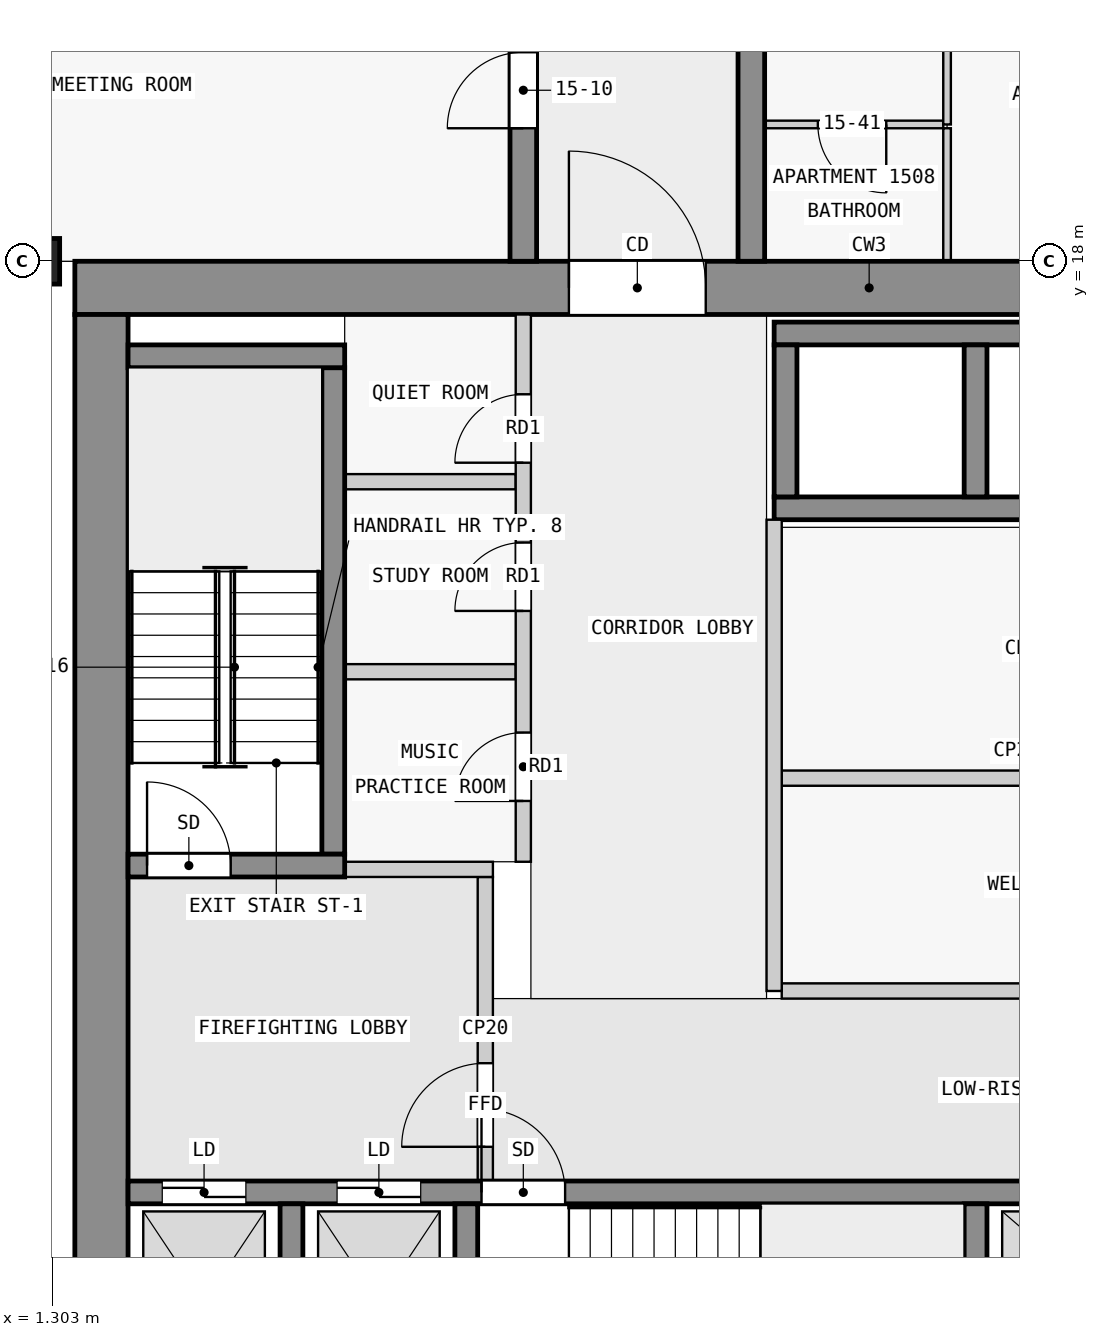
"""IFC4 building model, lengths in metres.
Left out: names, types, materials, properties, quantities, classifications, styles, units other than length and angle.
Written with IfcOpenShell. Run it as: python <this file> out.ifc"""

import sys

from ifc_helpers import new_model, si_unit, direction, frame, frame_2d, origin, origin_2d, place, context, subcontext, project, spatial, rectangle, extrude, element, fill, save


model = new_model("IFC4")
c1 = context("Model", 3, precision=1e-05, world=origin(), true_north=direction((0.0, 1.0)))
c2 = subcontext(c1, "Body", "Model", "MODEL_VIEW")
j1 = project(units=[si_unit("LENGTHUNIT", "METRE"), si_unit("PLANEANGLEUNIT", "RADIAN")], contexts=[c1])
p1 = place(None, origin())
s1 = spatial("IfcSite", under=j1, at=p1, CompositionType="ELEMENT")
p2 = place(p1, origin())
s2 = spatial("IfcBuilding", under=s1, at=p2, CompositionType="ELEMENT")
p3 = place(p2, frame((0.0, 0.0, 61.8)))
s3 = spatial("IfcBuildingStorey", under=s2, at=p3, CompositionType="ELEMENT", Elevation=61.8)
p4 = place(p3, frame((0.7, 18.0, 0.0), z_axis=(0.0, 0.0, 1.0), x_axis=(0.0, 1.0, 0.0)))
e1 = element("IfcColumn", 1, at=p4, inside=s3, PredefinedType="COLUMN", context=c2, shape_type="SweptSolid", body=[
    extrude(rectangle(XDim=0.6, YDim=1.4, at=origin_2d()), origin(), (0.0, 0.0, 1.0), 3.5),
])
p5 = place(p3, frame((1.6, 17.65, 0.0), z_axis=(0.0, 0.0, 1.0), x_axis=(1.0, 0.0, 0.0)))
e2 = element("IfcWall", 2, at=p5, inside=s3, PredefinedType="SHEAR", context=c2, shape_type="SweptSolid", body=[
    extrude(rectangle(XDim=20.9, YDim=0.7, at=frame_2d((10.45, 0.0))), origin(), (0.0, 0.0, 1.0), 3.25),
])
p6 = place(p5, frame((6.5, 0.0, 0.0)))
e3 = element("IfcOpeningElement", 3, at=p6, cuts=e2, PredefinedType="OPENING", context=c2, shape_type="SweptSolid", body=[
    extrude(rectangle(XDim=1.8, YDim=2.1, at=frame_2d((0.9, 1.05))), frame((0.0, 0.36, 0.0), z_axis=(0.0, -1.0, 0.0), x_axis=(1.0, 0.0, 0.0)), (0.0, 0.0, 1.0), 0.72),
])
p7 = place(p3, frame((1.95, 2.5, 0.0), z_axis=(0.0, 0.0, 1.0), x_axis=(0.0, 1.0, 0.0)))
e4 = element("IfcWall", 4, at=p7, inside=s3, PredefinedType="SHEAR", context=c2, shape_type="SweptSolid", body=[
    extrude(rectangle(XDim=14.8, YDim=0.7, at=frame_2d((7.4, 0.0))), origin(), (0.0, 0.0, 1.0), 3.25),
])
for number, where, z_axis, x_axis in (
    (5, (4.45, 2.8, 0.0), (0.0, 0.0, 1.0), (0.0, 1.0, 0.0)),
    (6, (6.75, 2.8, 0.0), (0.0, 0.0, 1.0), (0.0, 1.0, 0.0)),
    (7, (13.45, 2.8, 0.0), (0.0, 0.0, 1.0), (0.0, 1.0, 0.0)),
):
    element("IfcWall", number, at=place(p3, frame(where, z_axis=z_axis, x_axis=x_axis)), inside=s3, PredefinedType="SHEAR", context=c2, shape_type="SweptSolid", body=[
        extrude(rectangle(XDim=2.8, YDim=0.3, at=frame_2d((1.4, 0.0))), origin(), (0.0, 0.0, 1.0), 3.25),
    ])
p8 = place(p3, frame((2.3, 5.75, 0.0), z_axis=(0.0, 0.0, 1.0), x_axis=(1.0, 0.0, 0.0)))
e8 = element("IfcWall", 8, at=p8, inside=s3, PredefinedType="SHEAR", context=c2, shape_type="SweptSolid", body=[
    extrude(rectangle(XDim=18.8, YDim=0.3, at=frame_2d((9.4, 0.0))), origin(), (0.0, 0.0, 1.0), 3.25),
])
p9 = place(p8, frame((4.65, 0.0, 0.0)))
e9 = element("IfcOpeningElement", 9, at=p9, cuts=e8, PredefinedType="OPENING", context=c2, shape_type="SweptSolid", body=[
    extrude(rectangle(XDim=1.1, YDim=2.1, at=frame_2d((0.55, 1.05))), frame((0.0, 0.16, 0.0), z_axis=(0.0, -1.0, 0.0), x_axis=(1.0, 0.0, 0.0)), (0.0, 0.0, 1.0), 0.32),
])
p10 = place(p8, frame((0.45, 0.0, 0.0)))
e10 = element("IfcOpeningElement", 10, at=p10, cuts=e8, PredefinedType="OPENING", context=c2, shape_type="SweptSolid", body=[
    extrude(rectangle(XDim=1.1, YDim=2.1, at=frame_2d((0.55, 1.05))), frame((0.0, 0.16, 0.0), z_axis=(0.0, -1.0, 0.0), x_axis=(1.0, 0.0, 0.0)), (0.0, 0.0, 1.0), 0.32),
])
p11 = place(p8, frame((2.75, 0.0, 0.0)))
e11 = element("IfcOpeningElement", 11, at=p11, cuts=e8, PredefinedType="OPENING", context=c2, shape_type="SweptSolid", body=[
    extrude(rectangle(XDim=1.1, YDim=2.1, at=frame_2d((0.55, 1.05))), frame((0.0, 0.16, 0.0), z_axis=(0.0, -1.0, 0.0), x_axis=(1.0, 0.0, 0.0)), (0.0, 0.0, 1.0), 0.32),
])
p12 = place(p8, frame((11.85, 0.0, 0.0)))
e12 = element("IfcOpeningElement", 12, at=p12, cuts=e8, PredefinedType="OPENING", context=c2, shape_type="SweptSolid", body=[
    extrude(rectangle(XDim=1.1, YDim=2.1, at=frame_2d((0.55, 1.05))), frame((0.0, 0.16, 0.0), z_axis=(0.0, -1.0, 0.0), x_axis=(1.0, 0.0, 0.0)), (0.0, 0.0, 1.0), 0.32),
])
p13 = place(p8, frame((14.35, 0.0, 0.0)))
e13 = element("IfcOpeningElement", 13, at=p13, cuts=e8, PredefinedType="OPENING", context=c2, shape_type="SweptSolid", body=[
    extrude(rectangle(XDim=1.1, YDim=2.1, at=frame_2d((0.55, 1.05))), frame((0.0, 0.16, 0.0), z_axis=(0.0, -1.0, 0.0), x_axis=(1.0, 0.0, 0.0)), (0.0, 0.0, 1.0), 0.32),
])
p14 = place(p8, frame((16.85, 0.0, 0.0)))
e14 = element("IfcOpeningElement", 14, at=p14, cuts=e8, PredefinedType="OPENING", context=c2, shape_type="SweptSolid", body=[
    extrude(rectangle(XDim=1.1, YDim=2.1, at=frame_2d((0.55, 1.05))), frame((0.0, 0.16, 0.0), z_axis=(0.0, -1.0, 0.0), x_axis=(1.0, 0.0, 0.0)), (0.0, 0.0, 1.0), 0.32),
])
p15 = place(p3, frame((2.3, 10.05, 0.0), z_axis=(0.0, 0.0, 1.0), x_axis=(1.0, 0.0, 0.0)))
e15 = element("IfcWall", 15, at=p15, inside=s3, PredefinedType="SHEAR", context=c2, shape_type="SweptSolid", body=[
    extrude(rectangle(XDim=2.85, YDim=0.3, at=frame_2d((1.425, 0.0))), origin(), (0.0, 0.0, 1.0), 3.25),
])
p16 = place(p15, frame((0.25, 0.0, 0.0)))
e16 = element("IfcOpeningElement", 16, at=p16, cuts=e15, PredefinedType="OPENING", context=c2, shape_type="SweptSolid", body=[
    extrude(rectangle(XDim=1.1, YDim=2.1, at=frame_2d((0.55, 1.05))), frame((0.0, 0.16, 0.0), z_axis=(0.0, -1.0, 0.0), x_axis=(1.0, 0.0, 0.0)), (0.0, 0.0, 1.0), 0.32),
])
p17 = place(p3, frame((5.0, 10.2, 0.0), z_axis=(0.0, 0.0, 1.0), x_axis=(0.0, 1.0, 0.0)))
e17 = element("IfcWall", 17, at=p17, inside=s3, PredefinedType="SHEAR", context=c2, shape_type="SweptSolid", body=[
    extrude(rectangle(XDim=6.4, YDim=0.3, at=frame_2d((3.2, 0.0))), origin(), (0.0, 0.0, 1.0), 3.25),
])
p18 = place(p3, frame((2.3, 16.75, 0.0), z_axis=(0.0, 0.0, 1.0), x_axis=(1.0, 0.0, 0.0)))
e18 = element("IfcWall", 18, at=p18, inside=s3, PredefinedType="SHEAR", context=c2, shape_type="SweptSolid", body=[
    extrude(rectangle(XDim=2.85, YDim=0.3, at=frame_2d((1.425, 0.0))), origin(), (0.0, 0.0, 1.0), 3.25),
])
for number, where, z_axis, x_axis in (
    (19, (10.8, 17.05, 0.0), (0.0, 0.0, 1.0), (1.0, 0.0, 0.0)),
    (20, (10.8, 14.75, 0.0), (0.0, 0.0, 1.0), (1.0, 0.0, 0.0)),
):
    element("IfcWall", number, at=place(p3, frame(where, z_axis=z_axis, x_axis=x_axis)), inside=s3, PredefinedType="SHEAR", context=c2, shape_type="SweptSolid", body=[
        extrude(rectangle(XDim=7.8, YDim=0.3, at=frame_2d((3.9, 0.0))), origin(), (0.0, 0.0, 1.0), 3.25),
    ])
for number, where, z_axis, x_axis in (
    (21, (10.95, 14.9, 0.0), (0.0, 0.0, 1.0), (0.0, 1.0, 0.0)),
    (22, (13.45, 14.9, 0.0), (0.0, 0.0, 1.0), (0.0, 1.0, 0.0)),
):
    element("IfcWall", number, at=place(p3, frame(where, z_axis=z_axis, x_axis=x_axis)), inside=s3, PredefinedType="SHEAR", context=c2, shape_type="SweptSolid", body=[
        extrude(rectangle(XDim=2.0, YDim=0.3, at=frame_2d((1.0, 0.0))), origin(), (0.0, 0.0, 1.0), 3.25),
    ])
p19 = place(p3, frame((7.5, 18.0, 0.0), z_axis=(0.0, 0.0, 1.0), x_axis=(0.0, 1.0, 0.0)))
e23 = element("IfcWall", 23, at=p19, inside=s3, PredefinedType="SHEAR", context=c2, shape_type="SweptSolid", body=[
    extrude(rectangle(XDim=27.0, YDim=0.35, at=frame_2d((13.5, 0.0))), origin(), (0.0, 0.0, 1.0), 3.25),
])
p20 = place(p19, frame((1.75, 0.0, 0.0)))
e24 = element("IfcOpeningElement", 24, at=p20, cuts=e23, PredefinedType="OPENING", context=c2, shape_type="SweptSolid", body=[
    extrude(rectangle(XDim=1.0, YDim=2.1, at=frame_2d((0.5, 1.05))), frame((0.0, 0.185, 0.0), z_axis=(0.0, -1.0, 0.0), x_axis=(1.0, 0.0, 0.0)), (0.0, 0.0, 1.0), 0.37),
])
p21 = place(p19, frame((8.55, 0.0, 0.0)))
e25 = element("IfcOpeningElement", 25, at=p21, cuts=e23, PredefinedType="OPENING", context=c2, shape_type="SweptSolid", body=[
    extrude(rectangle(XDim=1.0, YDim=2.1, at=frame_2d((0.5, 1.05))), frame((0.0, 0.185, 0.0), z_axis=(0.0, -1.0, 0.0), x_axis=(1.0, 0.0, 0.0)), (0.0, 0.0, 1.0), 0.37),
])
p22 = place(p19, frame((15.25, 0.0, 0.0)))
e26 = element("IfcOpeningElement", 26, at=p22, cuts=e23, PredefinedType="OPENING", context=c2, shape_type="SweptSolid", body=[
    extrude(rectangle(XDim=1.0, YDim=2.1, at=frame_2d((0.5, 1.05))), frame((0.0, 0.185, 0.0), z_axis=(0.0, -1.0, 0.0), x_axis=(1.0, 0.0, 0.0)), (0.0, 0.0, 1.0), 0.37),
])
p23 = place(p19, frame((21.35, 0.0, 0.0)))
e27 = element("IfcOpeningElement", 27, at=p23, cuts=e23, PredefinedType="OPENING", context=c2, shape_type="SweptSolid", body=[
    extrude(rectangle(XDim=1.0, YDim=2.1, at=frame_2d((0.5, 1.05))), frame((0.0, 0.185, 0.0), z_axis=(0.0, -1.0, 0.0), x_axis=(1.0, 0.0, 0.0)), (0.0, 0.0, 1.0), 0.37),
])
p24 = place(p3, frame((10.5, 18.0, 0.0), z_axis=(0.0, 0.0, 1.0), x_axis=(0.0, 1.0, 0.0)))
e28 = element("IfcWall", 28, at=p24, inside=s3, PredefinedType="SHEAR", context=c2, shape_type="SweptSolid", body=[
    extrude(rectangle(XDim=27.0, YDim=0.35, at=frame_2d((13.5, 0.0))), origin(), (0.0, 0.0, 1.0), 3.25),
])
p25 = place(p24, frame((4.05, 0.0, 0.0)))
e29 = element("IfcOpeningElement", 29, at=p25, cuts=e28, PredefinedType="OPENING", context=c2, shape_type="SweptSolid", body=[
    extrude(rectangle(XDim=1.0, YDim=2.1, at=frame_2d((0.5, 1.05))), frame((0.0, 0.185, 0.0), z_axis=(0.0, -1.0, 0.0), x_axis=(1.0, 0.0, 0.0)), (0.0, 0.0, 1.0), 0.37),
])
p26 = place(p24, frame((10.75, 0.0, 0.0)))
e30 = element("IfcOpeningElement", 30, at=p26, cuts=e28, PredefinedType="OPENING", context=c2, shape_type="SweptSolid", body=[
    extrude(rectangle(XDim=1.0, YDim=2.1, at=frame_2d((0.5, 1.05))), frame((0.0, 0.185, 0.0), z_axis=(0.0, -1.0, 0.0), x_axis=(1.0, 0.0, 0.0)), (0.0, 0.0, 1.0), 0.37),
])
p27 = place(p24, frame((15.25, 0.0, 0.0)))
e31 = element("IfcOpeningElement", 31, at=p27, cuts=e28, PredefinedType="OPENING", context=c2, shape_type="SweptSolid", body=[
    extrude(rectangle(XDim=1.0, YDim=2.1, at=frame_2d((0.5, 1.05))), frame((0.0, 0.185, 0.0), z_axis=(0.0, -1.0, 0.0), x_axis=(1.0, 0.0, 0.0)), (0.0, 0.0, 1.0), 0.37),
])
p28 = place(p24, frame((19.75, 0.0, 0.0)))
e32 = element("IfcOpeningElement", 32, at=p28, cuts=e28, PredefinedType="OPENING", context=c2, shape_type="SweptSolid", body=[
    extrude(rectangle(XDim=1.0, YDim=2.1, at=frame_2d((0.5, 1.05))), frame((0.0, 0.185, 0.0), z_axis=(0.0, -1.0, 0.0), x_axis=(1.0, 0.0, 0.0)), (0.0, 0.0, 1.0), 0.37),
])
p29 = place(p24, frame((23.25, 0.0, 0.0)))
e33 = element("IfcOpeningElement", 33, at=p29, cuts=e28, PredefinedType="OPENING", context=c2, shape_type="SweptSolid", body=[
    extrude(rectangle(XDim=0.9, YDim=2.1, at=frame_2d((0.45, 1.05))), frame((0.0, 0.185, 0.0), z_axis=(0.0, -1.0, 0.0), x_axis=(1.0, 0.0, 0.0)), (0.0, 0.0, 1.0), 0.37),
])
p30 = place(p24, frame((25.45, 0.0, 0.0)))
e34 = element("IfcOpeningElement", 34, at=p30, cuts=e28, PredefinedType="OPENING", context=c2, shape_type="SweptSolid", body=[
    extrude(rectangle(XDim=1.0, YDim=2.1, at=frame_2d((0.5, 1.05))), frame((0.0, 0.185, 0.0), z_axis=(0.0, -1.0, 0.0), x_axis=(1.0, 0.0, 0.0)), (0.0, 0.0, 1.0), 0.37),
])
p31 = place(p3, frame((7.0, 5.9, 0.0), z_axis=(0.0, 0.0, 1.0), x_axis=(0.0, 1.0, 0.0)))
e35 = element("IfcWall", 35, at=p31, inside=s3, PredefinedType="PARTITIONING", context=c2, shape_type="SweptSolid", body=[
    extrude(rectangle(XDim=4.0, YDim=0.2, at=frame_2d((2.0, 0.0))), origin(), (0.0, 0.0, 1.0), 3.25),
])
p32 = place(p31, frame((0.45, 0.0, 0.0)))
e36 = element("IfcOpeningElement", 36, at=p32, cuts=e35, PredefinedType="OPENING", context=c2, shape_type="SweptSolid", body=[
    extrude(rectangle(XDim=1.1, YDim=2.1, at=frame_2d((0.55, 1.05))), frame((0.0, 0.11, 0.0), z_axis=(0.0, -1.0, 0.0), x_axis=(1.0, 0.0, 0.0)), (0.0, 0.0, 1.0), 0.22),
])
p33 = place(p3, frame((5.15, 10.0, 0.0), z_axis=(0.0, 0.0, 1.0), x_axis=(1.0, 0.0, 0.0)))
e37 = element("IfcWall", 37, at=p33, inside=s3, PredefinedType="PARTITIONING", context=c2, shape_type="SweptSolid", body=[
    extrude(rectangle(XDim=1.95, YDim=0.2, at=frame_2d((0.975, 0.0))), origin(), (0.0, 0.0, 1.0), 3.25),
])
p34 = place(p3, frame((10.8, 8.4, 0.0), z_axis=(0.0, 0.0, 1.0), x_axis=(0.0, 1.0, 0.0)))
e38 = element("IfcWall", 38, at=p34, inside=s3, PredefinedType="PARTITIONING", context=c2, shape_type="SweptSolid", body=[
    extrude(rectangle(XDim=6.2, YDim=0.2, at=frame_2d((3.1, 0.0))), origin(), (0.0, 0.0, 1.0), 3.25),
])
for number, where, z_axis, x_axis in (
    (39, (10.9, 8.4, 0.0), (0.0, 0.0, 1.0), (1.0, 0.0, 0.0)),
    (40, (10.9, 11.2, 0.0), (0.0, 0.0, 1.0), (1.0, 0.0, 0.0)),
):
    element("IfcWall", number, at=place(p3, frame(where, z_axis=z_axis, x_axis=x_axis)), inside=s3, PredefinedType="PARTITIONING", context=c2, shape_type="SweptSolid", body=[
        extrude(rectangle(XDim=7.4, YDim=0.2, at=frame_2d((3.7, 0.0))), origin(), (0.0, 0.0, 1.0), 3.25),
    ])
p35 = place(p3, frame((7.5, 10.1, 0.0), z_axis=(0.0, 0.0, 1.0), x_axis=(0.0, 1.0, 0.0)))
e41 = element("IfcWall", 41, at=p35, inside=s3, PredefinedType="PARTITIONING", context=c2, shape_type="SweptSolid", body=[
    extrude(rectangle(XDim=7.2, YDim=0.2, at=frame_2d((3.6, 0.0))), origin(), (0.0, 0.0, 1.0), 3.25),
])
p36 = place(p35, frame((0.8, 0.0, 0.0)))
e42 = element("IfcOpeningElement", 42, at=p36, cuts=e41, PredefinedType="OPENING", context=c2, shape_type="SweptSolid", body=[
    extrude(rectangle(XDim=0.9, YDim=2.1, at=frame_2d((0.45, 1.05))), frame((0.0, 0.11, 0.0), z_axis=(0.0, -1.0, 0.0), x_axis=(1.0, 0.0, 0.0)), (0.0, 0.0, 1.0), 0.22),
])
p37 = place(p35, frame((3.3, 0.0, 0.0)))
e43 = element("IfcOpeningElement", 43, at=p37, cuts=e41, PredefinedType="OPENING", context=c2, shape_type="SweptSolid", body=[
    extrude(rectangle(XDim=0.9, YDim=2.1, at=frame_2d((0.45, 1.05))), frame((0.0, 0.11, 0.0), z_axis=(0.0, -1.0, 0.0), x_axis=(1.0, 0.0, 0.0)), (0.0, 0.0, 1.0), 0.22),
])
p38 = place(p35, frame((5.25, 0.0, 0.0)))
e44 = element("IfcOpeningElement", 44, at=p38, cuts=e41, PredefinedType="OPENING", context=c2, shape_type="SweptSolid", body=[
    extrude(rectangle(XDim=0.9, YDim=2.1, at=frame_2d((0.45, 1.05))), frame((0.0, 0.11, 0.0), z_axis=(0.0, -1.0, 0.0), x_axis=(1.0, 0.0, 0.0)), (0.0, 0.0, 1.0), 0.22),
])
for number, where, z_axis, x_axis in (
    (45, (5.15, 12.6, 0.0), (0.0, 0.0, 1.0), (1.0, 0.0, 0.0)),
    (46, (5.15, 15.1, 0.0), (0.0, 0.0, 1.0), (1.0, 0.0, 0.0)),
):
    element("IfcWall", number, at=place(p3, frame(where, z_axis=z_axis, x_axis=x_axis)), inside=s3, PredefinedType="PARTITIONING", context=c2, shape_type="SweptSolid", body=[
        extrude(rectangle(XDim=2.25, YDim=0.2, at=frame_2d((1.125, 0.0))), origin(), (0.0, 0.0, 1.0), 3.25),
    ])
p39 = place(p3, frame((13.025, 19.8, 0.0), z_axis=(0.0, 0.0, 1.0), x_axis=(-1.0, 0.0, 0.0)))
e47 = element("IfcWall", 47, at=p39, inside=s3, PredefinedType="PARTITIONING", context=c2, shape_type="SweptSolid", body=[
    extrude(rectangle(XDim=2.35, YDim=0.1, at=frame_2d((1.175, 0.0))), origin(), (0.0, 0.0, 1.0), 3.25),
])
p40 = place(p39, frame((0.75, 0.0, 0.0)))
e48 = element("IfcOpeningElement", 48, at=p40, cuts=e47, PredefinedType="OPENING", context=c2, shape_type="SweptSolid", body=[
    extrude(rectangle(XDim=0.9, YDim=2.1, at=frame_2d((0.45, 1.05))), frame((0.0, 0.06, 0.0), z_axis=(0.0, -1.0, 0.0), x_axis=(1.0, 0.0, 0.0)), (0.0, 0.0, 1.0), 0.12),
])
p41 = place(p3, frame((13.075, 22.45, 0.0), z_axis=(0.0, 0.0, 1.0), x_axis=(0.0, -1.0, 0.0)))
e49 = element("IfcWall", 49, at=p41, inside=s3, PredefinedType="PARTITIONING", context=c2, shape_type="SweptSolid", body=[
    extrude(rectangle(XDim=2.65, YDim=0.1, at=frame_2d((1.325, 0.0))), origin(), (0.0, 0.0, 1.0), 3.25),
])
p42 = place(p3, frame((13.075, 18.0, 0.0), z_axis=(0.0, 0.0, 1.0), x_axis=(0.0, 1.0, 0.0)))
e50 = element("IfcWall", 50, at=p42, inside=s3, PredefinedType="PARTITIONING", context=c2, shape_type="SweptSolid", body=[
    extrude(rectangle(XDim=1.75, YDim=0.1, at=frame_2d((0.875, 0.0))), origin(), (0.0, 0.0, 1.0), 3.25),
])
p43 = place(p32, origin())
e51 = element("IfcDoor", 51, at=p43, inside=s3, OperationType="SINGLE_SWING_LEFT", PredefinedType="DOOR", context=c2, shape_type="SweptSolid", body=[
    extrude(rectangle(XDim=1.1, YDim=2.1, at=frame_2d((0.55, 1.05))), frame((0.0, 0.025, 0.0), z_axis=(0.0, -1.0, 0.0), x_axis=(1.0, 0.0, 0.0)), (0.0, 0.0, 1.0), 0.05),
])
fill(e36, e51)
p44 = place(p16, origin())
e52 = element("IfcDoor", 52, at=p44, inside=s3, OperationType="SINGLE_SWING_RIGHT", PredefinedType="DOOR", context=c2, shape_type="SweptSolid", body=[
    extrude(rectangle(XDim=1.1, YDim=2.1, at=frame_2d((0.55, 1.05))), frame((0.0, 0.025, 0.0), z_axis=(0.0, -1.0, 0.0), x_axis=(1.0, 0.0, 0.0)), (0.0, 0.0, 1.0), 0.05),
])
fill(e16, e52)
p45 = place(p9, origin())
e53 = element("IfcDoor", 53, at=p45, inside=s3, OperationType="SINGLE_SWING_LEFT", PredefinedType="DOOR", context=c2, shape_type="SweptSolid", body=[
    extrude(rectangle(XDim=1.1, YDim=2.1, at=frame_2d((0.55, 1.05))), frame((0.0, 0.025, 0.0), z_axis=(0.0, -1.0, 0.0), x_axis=(1.0, 0.0, 0.0)), (0.0, 0.0, 1.0), 0.05),
])
fill(e9, e53)
p46 = place(p10, origin())
e54 = element("IfcDoor", 54, at=p46, inside=s3, OperationType="DOUBLE_DOOR_SLIDING", PredefinedType="DOOR", context=c2, shape_type="SweptSolid", body=[
    extrude(rectangle(XDim=1.1, YDim=2.1, at=frame_2d((0.55, 1.05))), frame((0.0, 0.025, 0.0), z_axis=(0.0, -1.0, 0.0), x_axis=(1.0, 0.0, 0.0)), (0.0, 0.0, 1.0), 0.05),
])
fill(e10, e54)
p47 = place(p11, origin())
e55 = element("IfcDoor", 55, at=p47, inside=s3, OperationType="DOUBLE_DOOR_SLIDING", PredefinedType="DOOR", context=c2, shape_type="SweptSolid", body=[
    extrude(rectangle(XDim=1.1, YDim=2.1, at=frame_2d((0.55, 1.05))), frame((0.0, 0.025, 0.0), z_axis=(0.0, -1.0, 0.0), x_axis=(1.0, 0.0, 0.0)), (0.0, 0.0, 1.0), 0.05),
])
fill(e11, e55)
p48 = place(p6, origin())
e56 = element("IfcDoor", 56, at=p48, inside=s3, OperationType="DOUBLE_DOOR_SINGLE_SWING", PredefinedType="DOOR", context=c2, shape_type="SweptSolid", body=[
    extrude(rectangle(XDim=1.8, YDim=2.1, at=frame_2d((0.9, 1.05))), frame((0.0, 0.025, 0.0), z_axis=(0.0, -1.0, 0.0), x_axis=(1.0, 0.0, 0.0)), (0.0, 0.0, 1.0), 0.05),
])
fill(e3, e56)
p49 = place(p36, origin())
e57 = element("IfcDoor", 57, at=p49, inside=s3, OperationType="SINGLE_SWING_RIGHT", PredefinedType="DOOR", context=c2, shape_type="SweptSolid", body=[
    extrude(rectangle(XDim=0.9, YDim=2.1, at=frame_2d((0.45, 1.05))), frame((0.0, 0.025, 0.0), z_axis=(0.0, -1.0, 0.0), x_axis=(1.0, 0.0, 0.0)), (0.0, 0.0, 1.0), 0.05),
])
fill(e42, e57)
p50 = place(p37, origin())
e58 = element("IfcDoor", 58, at=p50, inside=s3, OperationType="SINGLE_SWING_RIGHT", PredefinedType="DOOR", context=c2, shape_type="SweptSolid", body=[
    extrude(rectangle(XDim=0.9, YDim=2.1, at=frame_2d((0.45, 1.05))), frame((0.0, 0.025, 0.0), z_axis=(0.0, -1.0, 0.0), x_axis=(1.0, 0.0, 0.0)), (0.0, 0.0, 1.0), 0.05),
])
fill(e43, e58)
p51 = place(p38, origin())
e59 = element("IfcDoor", 59, at=p51, inside=s3, OperationType="SINGLE_SWING_RIGHT", PredefinedType="DOOR", context=c2, shape_type="SweptSolid", body=[
    extrude(rectangle(XDim=0.9, YDim=2.1, at=frame_2d((0.45, 1.05))), frame((0.0, 0.025, 0.0), z_axis=(0.0, -1.0, 0.0), x_axis=(1.0, 0.0, 0.0)), (0.0, 0.0, 1.0), 0.05),
])
fill(e44, e59)
p52 = place(p20, origin())
e60 = element("IfcDoor", 60, at=p52, inside=s3, OperationType="SINGLE_SWING_LEFT", PredefinedType="DOOR", context=c2, shape_type="SweptSolid", body=[
    extrude(rectangle(XDim=1.0, YDim=2.1, at=frame_2d((0.5, 1.05))), frame((0.0, 0.025, 0.0), z_axis=(0.0, -1.0, 0.0), x_axis=(1.0, 0.0, 0.0)), (0.0, 0.0, 1.0), 0.05),
])
fill(e24, e60)
p53 = place(p40, origin())
e61 = element("IfcDoor", 61, at=p53, inside=s3, OperationType="SINGLE_SWING_RIGHT", PredefinedType="DOOR", context=c2, shape_type="SweptSolid", body=[
    extrude(rectangle(XDim=0.9, YDim=2.1, at=frame_2d((0.45, 1.05))), frame((0.0, 0.025, 0.0), z_axis=(0.0, -1.0, 0.0), x_axis=(1.0, 0.0, 0.0)), (0.0, 0.0, 1.0), 0.05),
])
fill(e48, e61)
save(model, sys.argv[1])
